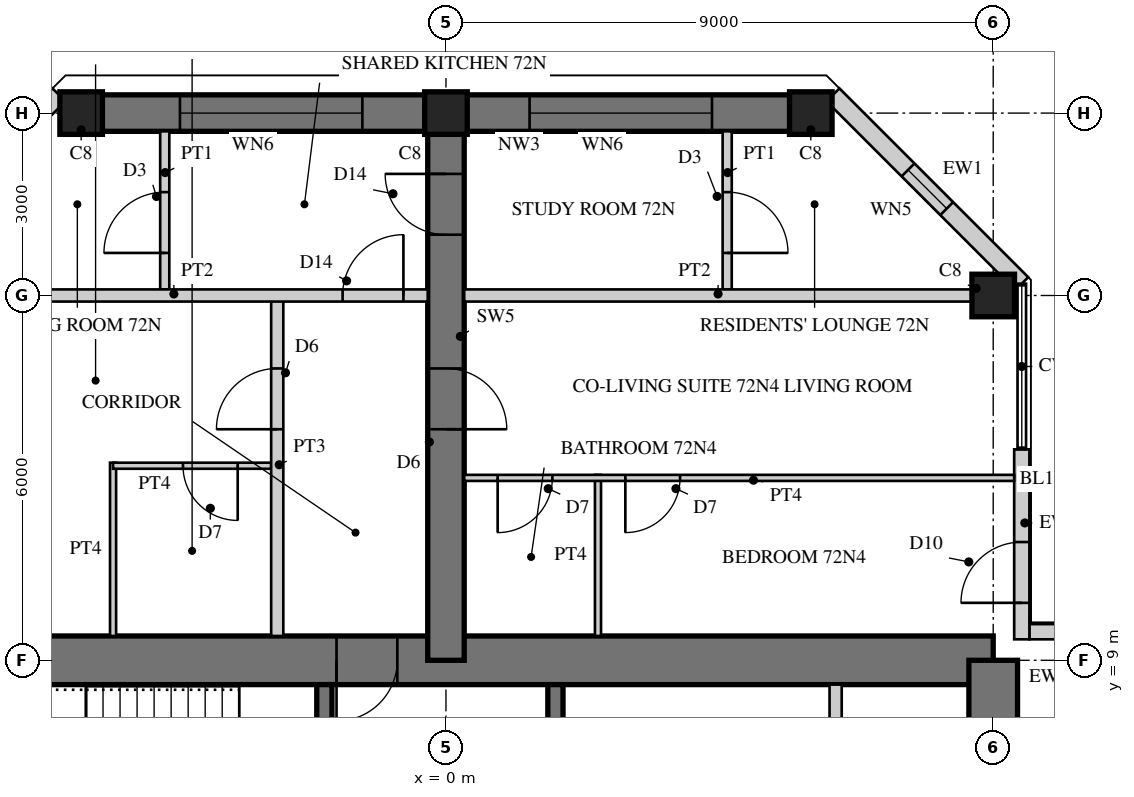
"""IFC4 building model, lengths in metres.
Left out: names, types, materials, properties, quantities, classifications, styles, units other than length and angle.
Written with IfcOpenShell. Run it as: python <this file> out.ifc"""

import sys

from ifc_helpers import new_model, si_unit, direction, frame, frame_2d, origin, origin_2d, place, context, subcontext, project, spatial, rectangle, hollow_rectangle, extrude, element, fill, save


model = new_model("IFC4")
c1 = context("Model", 3, precision=1e-05, world=origin(), true_north=direction((0.0, 1.0)))
c2 = subcontext(c1, "Body", "Model", "MODEL_VIEW")
j1 = project(units=[si_unit("LENGTHUNIT", "METRE"), si_unit("PLANEANGLEUNIT", "RADIAN")], contexts=[c1])
p1 = place(None, origin())
s1 = spatial("IfcSite", under=j1, at=p1, CompositionType="ELEMENT")
p2 = place(p1, origin())
s2 = spatial("IfcBuilding", under=s1, at=p2, CompositionType="ELEMENT")
p3 = place(p2, frame((0.0, 0.0, 278.1)))
s3 = spatial("IfcBuildingStorey", under=s2, at=p3, CompositionType="ELEMENT", Elevation=278.1)
p4 = place(p3, frame((9.0, 9.0, 0.0), z_axis=(0.0, 0.0, 1.0), x_axis=(-1.0, 0.0, 0.0)))
e1 = element("IfcWall", 1, at=p4, inside=s3, PredefinedType="SHEAR", context=c2, shape_type="SweptSolid", body=[
    extrude(rectangle(XDim=18.0, YDim=0.8, at=frame_2d((9.0, 0.0))), origin(), (0.0, 0.0, 1.0), 3.4),
])
p5 = place(p4, frame((9.8, 0.0, 0.0)))
e2 = element("IfcOpeningElement", 2, at=p5, cuts=e1, PredefinedType="OPENING", context=c2, shape_type="SweptSolid", body=[
    extrude(rectangle(XDim=1.0, YDim=2.4, at=frame_2d((0.5, 1.2))), frame((0.0, 0.41, 0.0), z_axis=(0.0, -1.0, 0.0), x_axis=(1.0, 0.0, 0.0)), (0.0, 0.0, 1.0), 0.82),
])
p6 = place(p3, frame((9.0, -9.0, 0.0), z_axis=(0.0, 0.0, 1.0), x_axis=(0.0, 1.0, 0.0)))
e3 = element("IfcWall", 3, at=p6, inside=s3, PredefinedType="SHEAR", context=c2, shape_type="SweptSolid", body=[
    extrude(rectangle(XDim=18.0, YDim=0.8, at=frame_2d((9.0, 0.0))), origin(), (0.0, 0.0, 1.0), 3.4),
])
p7 = place(p6, frame((9.8, 0.0, 0.0)))
e4 = element("IfcOpeningElement", 4, at=p7, cuts=e3, PredefinedType="OPENING", context=c2, shape_type="SweptSolid", body=[
    extrude(rectangle(XDim=1.0, YDim=2.4, at=frame_2d((0.5, 1.2))), frame((0.0, 0.41, 0.0), z_axis=(0.0, -1.0, 0.0), x_axis=(1.0, 0.0, 0.0)), (0.0, 0.0, 1.0), 0.82),
])
p8 = place(p3, frame((1.8, 1.875, 0.0), z_axis=(0.0, 0.0, 1.0), x_axis=(0.0, 1.0, 0.0)))
e5 = element("IfcWall", 5, at=p8, inside=s3, PredefinedType="SHEAR", context=c2, shape_type="SweptSolid", body=[
    extrude(rectangle(XDim=6.725, YDim=0.25, at=frame_2d((3.363, 0.0))), origin(), (0.0, 0.0, 1.0), 3.4),
])
p9 = place(p8, frame((1.875, 0.0, 0.0)))
e6 = element("IfcOpeningElement", 6, at=p9, cuts=e5, PredefinedType="OPENING", context=c2, shape_type="SweptSolid", body=[
    extrude(rectangle(XDim=1.6, YDim=2.4, at=frame_2d((0.8, 1.2))), frame((0.0, 0.135, 0.0), z_axis=(0.0, -1.0, 0.0), x_axis=(1.0, 0.0, 0.0)), (0.0, 0.0, 1.0), 0.27),
])
p10 = place(p3, frame((6.408, 5.975, 0.0), z_axis=(0.0, 0.0, 1.0), x_axis=(0.0, 1.0, 0.0)))
e7 = element("IfcWall", 7, at=p10, inside=s3, PredefinedType="PARTITIONING", context=c2, shape_type="SweptSolid", body=[
    extrude(rectangle(XDim=2.625, YDim=0.2, at=frame_2d((1.312, 0.0))), origin(), (0.0, 0.0, 1.0), 3.4),
])
p11 = place(p3, frame((-2.0, 1.675, 0.0), z_axis=(0.0, 0.0, 1.0), x_axis=(0.0, 1.0, 0.0)))
e8 = element("IfcWall", 8, at=p11, inside=s3, PredefinedType="SHEAR", context=c2, shape_type="SweptSolid", body=[
    extrude(rectangle(XDim=6.925, YDim=0.25, at=frame_2d((3.462, 0.0))), origin(), (0.0, 0.0, 1.0), 3.4),
])
p12 = place(p11, frame((0.725, 0.0, 0.0)))
e9 = element("IfcOpeningElement", 9, at=p12, cuts=e8, PredefinedType="OPENING", context=c2, shape_type="SweptSolid", body=[
    extrude(rectangle(XDim=1.0, YDim=2.1, at=frame_2d((0.5, 1.05))), frame((0.0, 0.135, 0.0), z_axis=(0.0, -1.0, 0.0), x_axis=(1.0, 0.0, 0.0)), (0.0, 0.0, 1.0), 0.27),
])
p13 = place(p3, frame((0.0, 9.0, 0.0), z_axis=(0.0, 0.0, 1.0), x_axis=(0.0, 1.0, 0.0)))
e10 = element("IfcWall", 10, at=p13, inside=s3, PredefinedType="SHEAR", context=c2, shape_type="SweptSolid", body=[
    extrude(rectangle(XDim=9.0, YDim=0.6, at=frame_2d((4.5, 0.0))), origin(), (0.0, 0.0, 1.0), 3.4),
])
p14 = place(p13, frame((3.8, 0.0, 0.0)))
e11 = element("IfcOpeningElement", 11, at=p14, cuts=e10, PredefinedType="OPENING", context=c2, shape_type="SweptSolid", body=[
    extrude(rectangle(XDim=1.0, YDim=2.15, at=frame_2d((0.5, 1.075))), frame((0.0, 0.31, 0.0), z_axis=(0.0, -1.0, 0.0), x_axis=(1.0, 0.0, 0.0)), (0.0, 0.0, 1.0), 0.62),
])
p15 = place(p13, frame((7.0, 0.0, 0.0)))
e12 = element("IfcOpeningElement", 12, at=p15, cuts=e10, PredefinedType="OPENING", context=c2, shape_type="SweptSolid", body=[
    extrude(rectangle(XDim=1.0, YDim=2.2, at=frame_2d((0.5, 1.1))), frame((0.0, 0.31, 0.0), z_axis=(0.0, -1.0, 0.0), x_axis=(1.0, 0.0, 0.0)), (0.0, 0.0, 1.0), 0.62),
])
p16 = place(p3, frame((6.0, 18.0, 0.0), z_axis=(0.0, 0.0, 1.0), x_axis=(-1.0, 0.0, 0.0)))
e13 = element("IfcWall", 13, at=p16, inside=s3, PredefinedType="SHEAR", context=c2, shape_type="SweptSolid", body=[
    extrude(rectangle(XDim=12.0, YDim=0.6, at=frame_2d((6.0, 0.0))), origin(), (0.0, 0.0, 1.0), 3.4),
])
p17 = place(p16, frame((1.625, 0.0, 0.6)))
e14 = element("IfcOpeningElement", 14, at=p17, cuts=e13, PredefinedType="OPENING", context=c2, shape_type="SweptSolid", body=[
    extrude(rectangle(XDim=3.0, YDim=2.4, at=frame_2d((1.5, 1.2))), frame((0.0, 0.31, 0.0), z_axis=(0.0, -1.0, 0.0), x_axis=(1.0, 0.0, 0.0)), (0.0, 0.0, 1.0), 0.62),
])
p18 = place(p16, frame((7.375, 0.0, 0.6)))
e15 = element("IfcOpeningElement", 15, at=p18, cuts=e13, PredefinedType="OPENING", context=c2, shape_type="SweptSolid", body=[
    extrude(rectangle(XDim=3.0, YDim=2.4, at=frame_2d((1.5, 1.2))), frame((0.0, 0.31, 0.0), z_axis=(0.0, -1.0, 0.0), x_axis=(1.0, 0.0, 0.0)), (0.0, 0.0, 1.0), 0.62),
])
for number, where, z_axis, x_axis in (
    (16, (9.0, 15.0, 0.0), (0.0, 0.0, 1.0), (1.0, 0.0, 0.0)),
    (17, (6.0, 18.0, 0.0), (0.0, 0.0, 1.0), (1.0, 0.0, 0.0)),
    (18, (0.0, 18.0, 0.0), (0.0, 0.0, 1.0), (1.0, 0.0, 0.0)),
    (19, (-6.0, 18.0, 0.0), (0.0, 0.0, 1.0), (1.0, 0.0, 0.0)),
):
    element("IfcColumn", number, at=place(p3, frame(where, z_axis=z_axis, x_axis=x_axis)), inside=s3, PredefinedType="COLUMN", context=c2, shape_type="SweptSolid", body=[
        extrude(rectangle(XDim=0.7, YDim=0.7, at=origin_2d()), origin(), (0.0, 0.0, 1.0), 3.4),
    ])
p19 = place(p3, frame((12.47, 9.47, 0.0), z_axis=(0.0, 0.0, 1.0), x_axis=(-1.0, 0.0, 0.0)))
e20 = element("IfcWall", 20, at=p19, inside=s3, PredefinedType="SOLIDWALL", context=c2, shape_type="SweptSolid", body=[
    extrude(rectangle(XDim=2.875, YDim=0.25, at=frame_2d((1.438, 0.0))), origin(), (0.0, 0.0, 1.0), 3.22),
])
p20 = place(p19, frame((0.6, 0.0, 0.0)))
e21 = element("IfcOpeningElement", 21, at=p20, cuts=e20, PredefinedType="OPENING", context=c2, shape_type="SweptSolid", body=[
    extrude(rectangle(XDim=1.0, YDim=2.2, at=frame_2d((0.5, 1.1))), frame((0.0, 0.135, 0.0), z_axis=(0.0, -1.0, 0.0), x_axis=(1.0, 0.0, 0.0)), (0.0, 0.0, 1.0), 0.27),
])
p21 = place(p3, frame((9.47, 9.345, 0.0), z_axis=(0.0, 0.0, 1.0), x_axis=(0.0, 1.0, 0.0)))
e22 = element("IfcWall", 22, at=p21, inside=s3, PredefinedType="SOLIDWALL", context=c2, shape_type="SweptSolid", body=[
    extrude(rectangle(XDim=3.125, YDim=0.25, at=frame_2d((1.562, 0.0))), origin(), (0.0, 0.0, 1.0), 3.22),
])
p22 = place(p21, frame((0.6, 0.0, 0.0)))
e23 = element("IfcOpeningElement", 23, at=p22, cuts=e22, PredefinedType="OPENING", context=c2, shape_type="SweptSolid", body=[
    extrude(rectangle(XDim=1.0, YDim=2.2, at=frame_2d((0.5, 1.1))), frame((0.0, 0.135, 0.0), z_axis=(0.0, -1.0, 0.0), x_axis=(1.0, 0.0, 0.0)), (0.0, 0.0, 1.0), 0.27),
])
p23 = place(p3, frame((9.47, 15.195, 0.0), z_axis=(0.0, 0.0, 1.0), x_axis=(-0.70707898447, 0.707134576811, 0.0)))
e24 = element("IfcWall", 24, at=p23, inside=s3, PredefinedType="SOLIDWALL", context=c2, shape_type="SweptSolid", body=[
    extrude(rectangle(XDim=4.392, YDim=0.3, at=frame_2d((2.196, 0.0))), origin(), (0.0, 0.0, 1.0), 3.22),
])
p24 = place(p23, frame((1.746, 0.0, 0.3)))
e25 = element("IfcOpeningElement", 25, at=p24, cuts=e24, PredefinedType="OPENING", context=c2, shape_type="SweptSolid", body=[
    extrude(rectangle(XDim=0.9, YDim=2.4, at=frame_2d((0.45, 1.2))), frame((0.0, 0.16, 0.0), z_axis=(0.0, -1.0, 0.0), x_axis=(1.0, 0.0, 0.0)), (0.0, 0.0, 1.0), 0.32),
])
p25 = place(p3, frame((-6.365, 18.3, 0.0), z_axis=(0.0, 0.0, 1.0), x_axis=(-0.70707898447, -0.707134576811, 0.0)))
e26 = element("IfcWall", 26, at=p25, inside=s3, PredefinedType="SOLIDWALL", context=c2, shape_type="SweptSolid", body=[
    extrude(rectangle(XDim=4.392, YDim=0.3, at=frame_2d((2.196, 0.0))), origin(), (0.0, 0.0, 1.0), 3.22),
])
p26 = place(p25, frame((1.746, 0.0, 0.3)))
e27 = element("IfcOpeningElement", 27, at=p26, cuts=e26, PredefinedType="OPENING", context=c2, shape_type="SweptSolid", body=[
    extrude(rectangle(XDim=0.9, YDim=2.4, at=frame_2d((0.45, 1.2))), frame((0.0, 0.16, 0.0), z_axis=(0.0, -1.0, 0.0), x_axis=(1.0, 0.0, 0.0)), (0.0, 0.0, 1.0), 0.32),
])
p27 = place(p3, frame((-5.475, 9.4, 0.0), z_axis=(0.0, 0.0, 1.0), x_axis=(0.0, 1.0, 0.0)))
e28 = element("IfcWall", 28, at=p27, inside=s3, PredefinedType="PARTITIONING", context=c2, shape_type="SweptSolid", body=[
    extrude(rectangle(XDim=2.85, YDim=0.1, at=frame_2d((1.425, 0.0))), origin(), (0.0, 0.0, 1.0), 3.22),
])
p28 = place(p3, frame((-2.875, 12.2, 0.0), z_axis=(0.0, 0.0, 1.0), x_axis=(-1.0, 0.0, 0.0)))
e29 = element("IfcWall", 29, at=p28, inside=s3, PredefinedType="PARTITIONING", context=c2, shape_type="SweptSolid", body=[
    extrude(rectangle(XDim=2.6, YDim=0.1, at=frame_2d((1.3, 0.0))), origin(), (0.0, 0.0, 1.0), 3.22),
])
p29 = place(p28, frame((0.55, 0.0, 0.0)))
e30 = element("IfcOpeningElement", 30, at=p29, cuts=e29, PredefinedType="OPENING", context=c2, shape_type="SweptSolid", body=[
    extrude(rectangle(XDim=0.9, YDim=2.1, at=frame_2d((0.45, 1.05))), frame((0.0, 0.06, 0.0), z_axis=(0.0, -1.0, 0.0), x_axis=(1.0, 0.0, 0.0)), (0.0, 0.0, 1.0), 0.12),
])
p30 = place(p3, frame((2.5, 9.4, 0.0), z_axis=(0.0, 0.0, 1.0), x_axis=(0.0, 1.0, 0.0)))
e31 = element("IfcWall", 31, at=p30, inside=s3, PredefinedType="PARTITIONING", context=c2, shape_type="SweptSolid", body=[
    extrude(rectangle(XDim=2.65, YDim=0.1, at=frame_2d((1.325, 0.0))), origin(), (0.0, 0.0, 1.0), 3.22),
])
p31 = place(p3, frame((9.345, 12.0, 0.0), z_axis=(0.0, 0.0, 1.0), x_axis=(-1.0, 0.0, 0.0)))
e32 = element("IfcWall", 32, at=p31, inside=s3, PredefinedType="PARTITIONING", context=c2, shape_type="SweptSolid", body=[
    extrude(rectangle(XDim=9.045, YDim=0.1, at=frame_2d((4.522, 0.0))), origin(), (0.0, 0.0, 1.0), 3.22),
])
p32 = place(p31, frame((5.495, 0.0, 0.0)))
e33 = element("IfcOpeningElement", 33, at=p32, cuts=e32, PredefinedType="OPENING", context=c2, shape_type="SweptSolid", body=[
    extrude(rectangle(XDim=0.9, YDim=2.1, at=frame_2d((0.45, 1.05))), frame((0.0, 0.06, 0.0), z_axis=(0.0, -1.0, 0.0), x_axis=(1.0, 0.0, 0.0)), (0.0, 0.0, 1.0), 0.12),
])
p33 = place(p31, frame((7.595, 0.0, 0.0)))
e34 = element("IfcOpeningElement", 34, at=p33, cuts=e32, PredefinedType="OPENING", context=c2, shape_type="SweptSolid", body=[
    extrude(rectangle(XDim=0.9, YDim=2.1, at=frame_2d((0.45, 1.05))), frame((0.0, 0.06, 0.0), z_axis=(0.0, -1.0, 0.0), x_axis=(1.0, 0.0, 0.0)), (0.0, 0.0, 1.0), 0.12),
])
p34 = place(p3, frame((-2.775, 9.4, 0.0), z_axis=(0.0, 0.0, 1.0), x_axis=(0.0, 1.0, 0.0)))
e35 = element("IfcWall", 35, at=p34, inside=s3, PredefinedType="SOLIDWALL", context=c2, shape_type="SweptSolid", body=[
    extrude(rectangle(XDim=5.6, YDim=0.2, at=frame_2d((2.8, 0.0))), origin(), (0.0, 0.0, 1.0), 3.22),
])
p35 = place(p34, frame((3.4, 0.0, 0.0)))
e36 = element("IfcOpeningElement", 36, at=p35, cuts=e35, PredefinedType="OPENING", context=c2, shape_type="SweptSolid", body=[
    extrude(rectangle(XDim=1.0, YDim=2.15, at=frame_2d((0.5, 1.075))), frame((0.0, 0.11, 0.0), z_axis=(0.0, -1.0, 0.0), x_axis=(1.0, 0.0, 0.0)), (0.0, 0.0, 1.0), 0.22),
])
p36 = place(p3, frame((-4.625, 15.1, 0.0), z_axis=(0.0, 0.0, 1.0), x_axis=(0.0, 1.0, 0.0)))
e37 = element("IfcWall", 37, at=p36, inside=s3, PredefinedType="PARTITIONING", context=c2, shape_type="SweptSolid", body=[
    extrude(rectangle(XDim=2.6, YDim=0.15, at=frame_2d((1.3, 0.0))), origin(), (0.0, 0.0, 1.0), 3.22),
])
p37 = place(p36, frame((0.6, 0.0, 0.0)))
e38 = element("IfcOpeningElement", 38, at=p37, cuts=e37, PredefinedType="OPENING", context=c2, shape_type="SweptSolid", body=[
    extrude(rectangle(XDim=1.0, YDim=2.1, at=frame_2d((0.5, 1.05))), frame((0.0, 0.085, 0.0), z_axis=(0.0, -1.0, 0.0), x_axis=(1.0, 0.0, 0.0)), (0.0, 0.0, 1.0), 0.17),
])
p38 = place(p3, frame((4.625, 15.1, 0.0), z_axis=(0.0, 0.0, 1.0), x_axis=(0.0, 1.0, 0.0)))
e39 = element("IfcWall", 39, at=p38, inside=s3, PredefinedType="PARTITIONING", context=c2, shape_type="SweptSolid", body=[
    extrude(rectangle(XDim=2.6, YDim=0.15, at=frame_2d((1.3, 0.0))), origin(), (0.0, 0.0, 1.0), 3.22),
])
p39 = place(p38, frame((0.6, 0.0, 0.0)))
e40 = element("IfcOpeningElement", 40, at=p39, cuts=e39, PredefinedType="OPENING", context=c2, shape_type="SweptSolid", body=[
    extrude(rectangle(XDim=1.0, YDim=2.1, at=frame_2d((0.5, 1.05))), frame((0.0, 0.085, 0.0), z_axis=(0.0, -1.0, 0.0), x_axis=(1.0, 0.0, 0.0)), (0.0, 0.0, 1.0), 0.17),
])
p40 = place(p3, frame((8.65, 15.0, 0.0), z_axis=(0.0, 0.0, 1.0), x_axis=(-1.0, 0.0, 0.0)))
e41 = element("IfcWall", 41, at=p40, inside=s3, PredefinedType="SOLIDWALL", context=c2, shape_type="SweptSolid", body=[
    extrude(rectangle(XDim=8.35, YDim=0.2, at=frame_2d((4.175, 0.0))), origin(), (0.0, 0.0, 1.0), 2.52),
])
p41 = place(p3, frame((-0.3, 15.0, 0.0), z_axis=(0.0, 0.0, 1.0), x_axis=(-1.0, 0.0, 0.0)))
e42 = element("IfcWall", 42, at=p41, inside=s3, PredefinedType="SOLIDWALL", context=c2, shape_type="SweptSolid", body=[
    extrude(rectangle(XDim=8.35, YDim=0.2, at=frame_2d((4.175, 0.0))), origin(), (0.0, 0.0, 1.0), 2.52),
])
p42 = place(p41, frame((0.4, 0.0, 0.0)))
e43 = element("IfcOpeningElement", 43, at=p42, cuts=e42, PredefinedType="OPENING", context=c2, shape_type="SweptSolid", body=[
    extrude(rectangle(XDim=1.0, YDim=2.2, at=frame_2d((0.5, 1.1))), frame((0.0, 0.11, 0.0), z_axis=(0.0, -1.0, 0.0), x_axis=(1.0, 0.0, 0.0)), (0.0, 0.0, 1.0), 0.22),
])
p43 = place(p22, origin())
e44 = element("IfcDoor", 44, at=p43, inside=s3, OperationType="SINGLE_SWING_LEFT", PredefinedType="DOOR", context=c2, shape_type="SweptSolid", body=[
    extrude(hollow_rectangle(XDim=1.0, YDim=2.2, WallThickness=0.06, at=frame_2d((0.5, 1.1))), frame((0.0, 0.025, 0.0), z_axis=(0.0, -1.0, 0.0), x_axis=(1.0, 0.0, 0.0)), (0.0, 0.0, 1.0), 0.05),
    extrude(rectangle(XDim=0.879, YDim=2.079, at=frame_2d((0.5, 1.1))), frame((0.0, 0.025, 0.0), z_axis=(0.0, -1.0, 0.0), x_axis=(1.0, 0.0, 0.0)), (0.0, 0.0, 1.0), 0.05),
])
fill(e23, e44)
p44 = place(p24, origin())
e45 = element("IfcWindow", 45, at=p44, inside=s3, PartitioningType="SINGLE_PANEL", PredefinedType="WINDOW", context=c2, shape_type="SweptSolid", body=[
    extrude(hollow_rectangle(XDim=0.9, YDim=2.4, WallThickness=0.06, at=frame_2d((0.45, 1.2))), frame((0.0, 0.03, 0.0), z_axis=(0.0, -1.0, 0.0), x_axis=(1.0, 0.0, 0.0)), (0.0, 0.0, 1.0), 0.06),
    extrude(rectangle(XDim=0.779, YDim=2.279, at=frame_2d((0.45, 1.2))), frame((0.0, 0.03, 0.0), z_axis=(0.0, -1.0, 0.0), x_axis=(1.0, 0.0, 0.0)), (0.0, 0.0, 1.0), 0.06),
])
fill(e25, e45)
p45 = place(p17, origin())
e46 = element("IfcWindow", 46, at=p45, inside=s3, PartitioningType="SINGLE_PANEL", PredefinedType="WINDOW", context=c2, shape_type="SweptSolid", body=[
    extrude(hollow_rectangle(XDim=3.0, YDim=2.4, WallThickness=0.06, at=frame_2d((1.5, 1.2))), frame((0.0, 0.03, 0.0), z_axis=(0.0, -1.0, 0.0), x_axis=(1.0, 0.0, 0.0)), (0.0, 0.0, 1.0), 0.06),
    extrude(rectangle(XDim=2.879, YDim=2.279, at=frame_2d((1.5, 1.2))), frame((0.0, 0.03, 0.0), z_axis=(0.0, -1.0, 0.0), x_axis=(1.0, 0.0, 0.0)), (0.0, 0.0, 1.0), 0.06),
])
fill(e14, e46)
p46 = place(p18, origin())
e47 = element("IfcWindow", 47, at=p46, inside=s3, PartitioningType="SINGLE_PANEL", PredefinedType="WINDOW", context=c2, shape_type="SweptSolid", body=[
    extrude(hollow_rectangle(XDim=3.0, YDim=2.4, WallThickness=0.06, at=frame_2d((1.5, 1.2))), frame((0.0, 0.03, 0.0), z_axis=(0.0, -1.0, 0.0), x_axis=(1.0, 0.0, 0.0)), (0.0, 0.0, 1.0), 0.06),
    extrude(rectangle(XDim=2.879, YDim=2.279, at=frame_2d((1.5, 1.2))), frame((0.0, 0.03, 0.0), z_axis=(0.0, -1.0, 0.0), x_axis=(1.0, 0.0, 0.0)), (0.0, 0.0, 1.0), 0.06),
])
fill(e15, e47)
p47 = place(p29, origin())
e48 = element("IfcDoor", 48, at=p47, inside=s3, OperationType="SINGLE_SWING_LEFT", PredefinedType="DOOR", context=c2, shape_type="SweptSolid", body=[
    extrude(rectangle(XDim=0.9, YDim=2.1, at=frame_2d((0.45, 1.05))), frame((0.0, 0.025, 0.0), z_axis=(0.0, -1.0, 0.0), x_axis=(1.0, 0.0, 0.0)), (0.0, 0.0, 1.0), 0.05),
])
fill(e30, e48)
p48 = place(p32, origin())
e49 = element("IfcDoor", 49, at=p48, inside=s3, OperationType="SINGLE_SWING_RIGHT", PredefinedType="DOOR", context=c2, shape_type="SweptSolid", body=[
    extrude(rectangle(XDim=0.9, YDim=2.1, at=frame_2d((0.45, 1.05))), frame((0.0, 0.025, 0.0), z_axis=(0.0, -1.0, 0.0), x_axis=(1.0, 0.0, 0.0)), (0.0, 0.0, 1.0), 0.05),
])
fill(e33, e49)
p49 = place(p33, origin())
e50 = element("IfcDoor", 50, at=p49, inside=s3, OperationType="SINGLE_SWING_RIGHT", PredefinedType="DOOR", context=c2, shape_type="SweptSolid", body=[
    extrude(rectangle(XDim=0.9, YDim=2.1, at=frame_2d((0.45, 1.05))), frame((0.0, 0.025, 0.0), z_axis=(0.0, -1.0, 0.0), x_axis=(1.0, 0.0, 0.0)), (0.0, 0.0, 1.0), 0.05),
])
fill(e34, e50)
p50 = place(p35, origin())
e51 = element("IfcDoor", 51, at=p50, inside=s3, OperationType="SINGLE_SWING_LEFT", PredefinedType="DOOR", context=c2, shape_type="SweptSolid", body=[
    extrude(rectangle(XDim=1.0, YDim=2.15, at=frame_2d((0.5, 1.075))), frame((0.0, 0.025, 0.0), z_axis=(0.0, -1.0, 0.0), x_axis=(1.0, 0.0, 0.0)), (0.0, 0.0, 1.0), 0.05),
])
fill(e36, e51)
p51 = place(p37, origin())
e52 = element("IfcDoor", 52, at=p51, inside=s3, OperationType="SINGLE_SWING_LEFT", PredefinedType="DOOR", context=c2, shape_type="SweptSolid", body=[
    extrude(rectangle(XDim=1.0, YDim=2.1, at=frame_2d((0.5, 1.05))), frame((0.0, 0.025, 0.0), z_axis=(0.0, -1.0, 0.0), x_axis=(1.0, 0.0, 0.0)), (0.0, 0.0, 1.0), 0.05),
])
fill(e38, e52)
p52 = place(p39, frame((1.0, 0.0, 0.0), z_axis=(0.0, 0.0, 1.0), x_axis=(-1.0, 0.0, 0.0)))
e53 = element("IfcDoor", 53, at=p52, inside=s3, OperationType="SINGLE_SWING_RIGHT", PredefinedType="DOOR", context=c2, shape_type="SweptSolid", body=[
    extrude(rectangle(XDim=1.0, YDim=2.1, at=frame_2d((0.5, 1.05))), frame((0.0, 0.025, 0.0), z_axis=(0.0, -1.0, 0.0), x_axis=(1.0, 0.0, 0.0)), (0.0, 0.0, 1.0), 0.05),
])
fill(e40, e53)
p53 = place(p42, frame((1.0, 0.0, 0.0), z_axis=(0.0, 0.0, 1.0), x_axis=(-1.0, 0.0, 0.0)))
e54 = element("IfcDoor", 54, at=p53, inside=s3, OperationType="SINGLE_SWING_RIGHT", PredefinedType="DOOR", context=c2, shape_type="SweptSolid", body=[
    extrude(rectangle(XDim=1.0, YDim=2.2, at=frame_2d((0.5, 1.1))), frame((0.0, 0.025, 0.0), z_axis=(0.0, -1.0, 0.0), x_axis=(1.0, 0.0, 0.0)), (0.0, 0.0, 1.0), 0.05),
])
fill(e43, e54)
p54 = place(p14, frame((1.0, 0.0, 0.0), z_axis=(0.0, 0.0, 1.0), x_axis=(-1.0, 0.0, 0.0)))
e55 = element("IfcDoor", 55, at=p54, inside=s3, OperationType="SINGLE_SWING_RIGHT", PredefinedType="DOOR", context=c2, shape_type="SweptSolid", body=[
    extrude(rectangle(XDim=1.0, YDim=2.15, at=frame_2d((0.5, 1.075))), frame((0.0, 0.025, 0.0), z_axis=(0.0, -1.0, 0.0), x_axis=(1.0, 0.0, 0.0)), (0.0, 0.0, 1.0), 0.05),
])
fill(e11, e55)
p55 = place(p15, origin())
e56 = element("IfcDoor", 56, at=p55, inside=s3, OperationType="SINGLE_SWING_RIGHT", PredefinedType="DOOR", context=c2, shape_type="SweptSolid", body=[
    extrude(rectangle(XDim=1.0, YDim=2.2, at=frame_2d((0.5, 1.1))), frame((0.0, 0.025, 0.0), z_axis=(0.0, -1.0, 0.0), x_axis=(1.0, 0.0, 0.0)), (0.0, 0.0, 1.0), 0.05),
])
fill(e12, e56)
p56 = place(p5, origin())
e57 = element("IfcDoor", 57, at=p56, inside=s3, OperationType="SINGLE_SWING_RIGHT", PredefinedType="DOOR", context=c2, shape_type="SweptSolid", body=[
    extrude(rectangle(XDim=1.0, YDim=2.4, at=frame_2d((0.5, 1.2))), frame((0.0, 0.055, 0.0), z_axis=(0.0, -1.0, 0.0), x_axis=(1.0, 0.0, 0.0)), (0.0, 0.0, 1.0), 0.05),
])
fill(e2, e57)
save(model, sys.argv[1])
